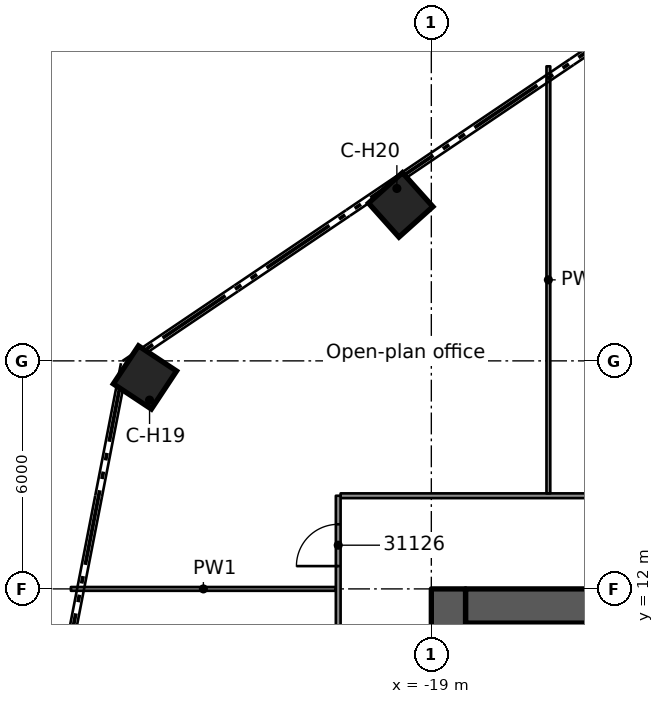
"""IFC4 building model, lengths in metres.
Left out: names, types, materials, properties, quantities, classifications, styles, units other than length and angle.
Written with IfcOpenShell. Run it as: python <this file> out.ifc"""

import sys

from ifc_helpers import new_model, si_unit, direction, frame, frame_2d, origin, origin_2d, place, context, subcontext, project, spatial, rectangle, extrude, element, fill, save


model = new_model("IFC4")
c1 = context("Model", 3, precision=1e-05, world=origin(), true_north=direction((0.0, 1.0)))
c2 = subcontext(c1, "Body", "Model", "MODEL_VIEW")
j1 = project(units=[si_unit("LENGTHUNIT", "METRE"), si_unit("PLANEANGLEUNIT", "RADIAN")], contexts=[c1])
p1 = place(None, origin())
s1 = spatial("IfcSite", under=j1, at=p1, CompositionType="ELEMENT")
p2 = place(p1, origin())
s2 = spatial("IfcBuilding", under=s1, at=p2, CompositionType="ELEMENT")
p3 = place(p2, frame((0.0, 0.0, 156.1)))
s3 = spatial("IfcBuildingStorey", under=s2, at=p3, CompositionType="ELEMENT", Elevation=156.1)
p4 = place(p3, frame((-18.1, 11.55, 0.0), z_axis=(0.0, 0.0, 1.0), x_axis=(1.0, 0.0, 0.0)))
e1 = element("IfcWall", 1, at=p4, inside=s3, PredefinedType="SHEAR", context=c2, shape_type="SweptSolid", body=[
    extrude(rectangle(XDim=9.2, YDim=0.9, at=frame_2d((4.6, 0.0))), origin(), (0.0, 0.0, 1.0), 3.5),
])
p5 = place(p4, frame((5.1, 0.0, 0.0)))
e2 = element("IfcOpeningElement", 2, at=p5, cuts=e1, PredefinedType="OPENING", context=c2, shape_type="SweptSolid", body=[
    extrude(rectangle(XDim=1.1, YDim=2.1, at=frame_2d((0.55, 1.05))), frame((0.0, 0.46, 0.0), z_axis=(0.0, -1.0, 0.0), x_axis=(1.0, 0.0, 0.0)), (0.0, 0.0, 1.0), 0.92),
])
p6 = place(p3, frame((-18.55, -12.0, 0.0), z_axis=(0.0, 0.0, 1.0), x_axis=(0.0, 1.0, 0.0)))
e3 = element("IfcWall", 3, at=p6, inside=s3, PredefinedType="SHEAR", context=c2, shape_type="SweptSolid", body=[
    extrude(rectangle(XDim=24.0, YDim=0.9, at=frame_2d((12.0, 0.0))), origin(), (0.0, 0.0, 1.0), 3.5),
])
p7 = place(p6, frame((10.1, 0.0, 0.0)))
e4 = element("IfcOpeningElement", 4, at=p7, cuts=e3, PredefinedType="OPENING", context=c2, shape_type="SweptSolid", body=[
    extrude(rectangle(XDim=1.8, YDim=2.1, at=frame_2d((0.9, 1.05))), frame((0.0, 0.46, 0.0), z_axis=(0.0, -1.0, 0.0), x_axis=(1.0, 0.0, 0.0)), (0.0, 0.0, 1.0), 0.92),
])
for number, where, z_axis, x_axis in (
    (5, (-26.536, 17.564, 0.0), (0.0, 0.0, 1.0), (-0.834, 0.552, 0.0)),
    (6, (-19.806, 22.104, 0.0), (0.0, 0.0, 1.0), (-0.667, 0.745, 0.0)),
):
    element("IfcColumn", number, at=place(p3, frame(where, z_axis=z_axis, x_axis=x_axis)), inside=s3, PredefinedType="COLUMN", context=c2, shape_type="SweptSolid", body=[
        extrude(rectangle(XDim=1.2, YDim=1.2, at=origin_2d()), origin(), (0.0, 0.0, 1.0), 3.5),
    ])
p8 = place(p3, frame((-28.484, 12.0, 0.0), z_axis=(0.0, 0.0, 1.0), x_axis=(1.0, 0.0, 0.0)))
e7 = element("IfcWall", 7, at=p8, inside=s3, PredefinedType="PARTITIONING", context=c2, shape_type="SweptSolid", body=[
    extrude(rectangle(XDim=6.972, YDim=0.1, at=frame_2d((3.486, 0.0))), origin(), (0.0, 0.0, 1.0), 3.08),
])
p9 = place(p3, frame((-21.387, 14.451, 0.0), z_axis=(0.0, 0.0, 1.0), x_axis=(1.0, 0.0, 0.0)))
e8 = element("IfcWall", 8, at=p9, inside=s3, PredefinedType="PARTITIONING", context=c2, shape_type="SweptSolid", body=[
    extrude(rectangle(XDim=10.996, YDim=0.125, at=frame_2d((5.498, 0.0))), origin(), (0.0, 0.0, 1.0), 3.08),
])
p10 = place(p9, frame((7.317, 0.0, 0.0)))
e9 = element("IfcOpeningElement", 9, at=p10, cuts=e8, PredefinedType="OPENING", context=c2, shape_type="SweptSolid", body=[
    extrude(rectangle(XDim=1.8, YDim=2.1, at=frame_2d((0.9, 1.05))), frame((0.0, 0.073, 0.0), z_axis=(0.0, -1.0, 0.0), x_axis=(1.0, 0.0, 0.0)), (0.0, 0.0, 1.0), 0.145),
])
p11 = place(p3, frame((-15.92, 14.514, 0.0), z_axis=(0.0, 0.0, 1.0), x_axis=(0.0, 1.0, 0.0)))
e10 = element("IfcWall", 10, at=p11, inside=s3, PredefinedType="PARTITIONING", context=c2, shape_type="SweptSolid", body=[
    extrude(rectangle(XDim=11.236, YDim=0.1, at=frame_2d((5.618, 0.0))), origin(), (0.0, 0.0, 1.0), 3.08),
])
p12 = place(p3, frame((-21.45, -14.451, 0.0), z_axis=(0.0, 0.0, 1.0), x_axis=(0.0, 1.0, 0.0)))
e11 = element("IfcWall", 11, at=p12, inside=s3, PredefinedType="PARTITIONING", context=c2, shape_type="SweptSolid", body=[
    extrude(rectangle(XDim=28.902, YDim=0.125, at=frame_2d((14.451, 0.0))), origin(), (0.0, 0.0, 1.0), 3.08),
])
p13 = place(p12, frame((5.6, 0.0, 0.0)))
e12 = element("IfcOpeningElement", 12, at=p13, cuts=e11, PredefinedType="OPENING", context=c2, shape_type="SweptSolid", body=[
    extrude(rectangle(XDim=1.8, YDim=2.1, at=frame_2d((0.9, 1.05))), frame((0.0, 0.073, 0.0), z_axis=(0.0, -1.0, 0.0), x_axis=(1.0, 0.0, 0.0)), (0.0, 0.0, 1.0), 0.145),
])
p14 = place(p12, frame((27.051, 0.0, 0.0)))
e13 = element("IfcOpeningElement", 13, at=p14, cuts=e11, PredefinedType="OPENING", context=c2, shape_type="SweptSolid", body=[
    extrude(rectangle(XDim=1.1, YDim=2.1, at=frame_2d((0.55, 1.05))), frame((0.0, 0.073, 0.0), z_axis=(0.0, -1.0, 0.0), x_axis=(1.0, 0.0, 0.0)), (0.0, 0.0, 1.0), 0.145),
])
p15 = place(p12, frame((19.327, 0.0, 0.0)))
e14 = element("IfcOpeningElement", 14, at=p15, cuts=e11, PredefinedType="OPENING", context=c2, shape_type="SweptSolid", body=[
    extrude(rectangle(XDim=1.1, YDim=2.1, at=frame_2d((0.55, 1.05))), frame((0.0, 0.073, 0.0), z_axis=(0.0, -1.0, 0.0), x_axis=(1.0, 0.0, 0.0)), (0.0, 0.0, 1.0), 0.145),
])
p16 = place(p14, origin())
e15 = element("IfcDoor", 15, at=p16, inside=s3, OperationType="SINGLE_SWING_RIGHT", PredefinedType="DOOR", context=c2, shape_type="SweptSolid", body=[
    extrude(rectangle(XDim=1.1, YDim=2.1, at=frame_2d((0.55, 1.05))), frame((0.0, 0.025, 0.0), z_axis=(0.0, -1.0, 0.0), x_axis=(1.0, 0.0, 0.0)), (0.0, 0.0, 1.0), 0.05),
])
fill(e13, e15)
save(model, sys.argv[1])
